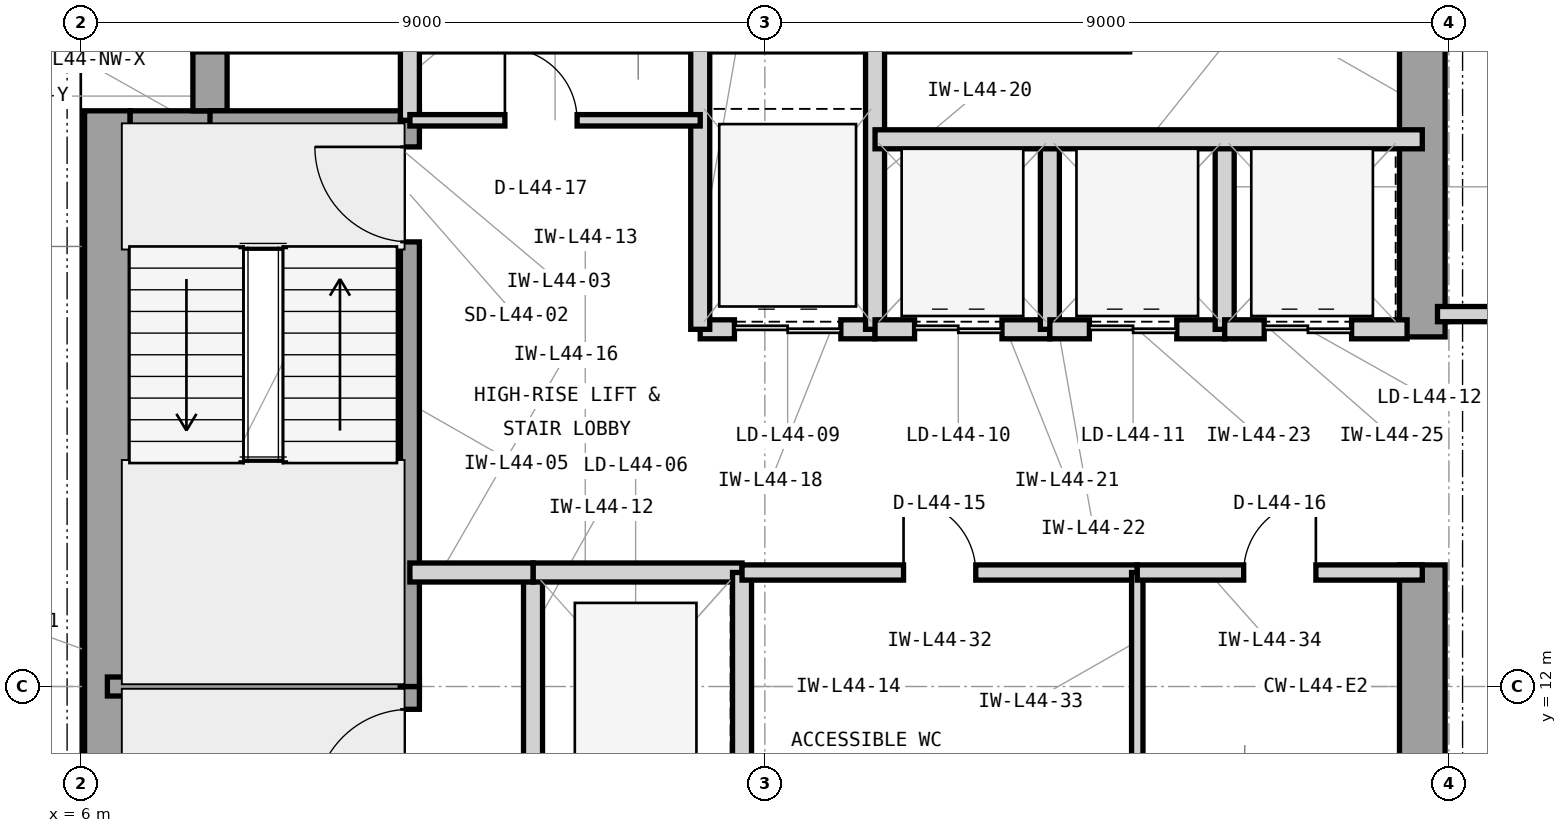
"""IFC4 building model, lengths in metres.
Left out: names, types, materials, properties, quantities, classifications, styles, units other than length and angle.
Written with IfcOpenShell. Run it as: python <this file> out.ifc"""

import sys

from ifc_helpers import new_model, si_unit, direction, frame, frame_2d, origin, place, context, subcontext, project, spatial, rectangle, extrude, element, fill, save


model = new_model("IFC4")
c1 = context("Model", 3, precision=1e-05, world=origin(), true_north=direction((0.0, 1.0)))
c2 = subcontext(c1, "Body", "Model", "MODEL_VIEW")
j1 = project(units=[si_unit("LENGTHUNIT", "METRE"), si_unit("PLANEANGLEUNIT", "RADIAN")], contexts=[c1])
p1 = place(None, origin())
s1 = spatial("IfcSite", under=j1, at=p1, CompositionType="ELEMENT")
p2 = place(p1, origin())
s2 = spatial("IfcBuilding", under=s1, at=p2, CompositionType="ELEMENT")
p3 = place(p2, frame((0.0, 0.0, 183.9)))
s3 = spatial("IfcBuildingStorey", under=s2, at=p3, CompositionType="ELEMENT", Elevation=183.9)
p4 = place(p3, frame((6.35, 4.425, 0.0), z_axis=(0.0, 0.0, 1.0), x_axis=(0.0, 1.0, 0.0)))
e1 = element("IfcWall", 1, at=p4, inside=s3, PredefinedType="SHEAR", context=c2, shape_type="SweptSolid", body=[
    extrude(rectangle(XDim=15.15, YDim=0.6, at=frame_2d((7.575, 0.0))), origin(), (0.0, 0.0, 1.0), 3.9),
])
p5 = place(p3, frame((7.475, 20.65, 0.0), z_axis=(0.0, 0.0, 1.0), x_axis=(1.0, 0.0, 0.0)))
e2 = element("IfcWall", 2, at=p5, inside=s3, PredefinedType="SHEAR", context=c2, shape_type="SweptSolid", body=[
    extrude(rectangle(XDim=12.325, YDim=0.6, at=frame_2d((6.163, 0.0))), origin(), (0.0, 0.0, 1.0), 3.9),
])
p6 = place(p3, frame((23.65, 10.4, 0.0), z_axis=(0.0, 0.0, 1.0), x_axis=(0.0, 1.0, 0.0)))
e3 = element("IfcWall", 3, at=p6, inside=s3, PredefinedType="SHEAR", context=c2, shape_type="SweptSolid", body=[
    extrude(rectangle(XDim=3.2, YDim=0.6, at=frame_2d((1.6, 0.0))), origin(), (0.0, 0.0, 1.0), 3.9),
])
p7 = place(p3, frame((23.65, 16.6, 0.0), z_axis=(0.0, 0.0, 1.0), x_axis=(0.0, 1.0, 0.0)))
e4 = element("IfcWall", 4, at=p7, inside=s3, PredefinedType="SHEAR", context=c2, shape_type="SweptSolid", body=[
    extrude(rectangle(XDim=4.05, YDim=0.6, at=frame_2d((2.025, 0.0))), origin(), (0.0, 0.0, 1.0), 3.9),
])
p8 = place(p3, frame((6.65, 19.35, 0.0), z_axis=(0.0, 0.0, 1.0), x_axis=(1.0, 0.0, 0.0)))
e5 = element("IfcWall", 5, at=p8, inside=s3, PredefinedType="SHEAR", context=c2, shape_type="SweptSolid", body=[
    extrude(rectangle(XDim=1.275, YDim=0.45, at=frame_2d((0.638, 0.0))), origin(), (0.0, 0.0, 1.0), 3.9),
])
p9 = place(p3, frame((7.7, 19.575, 0.0), z_axis=(0.0, 0.0, 1.0), x_axis=(0.0, 1.0, 0.0)))
e6 = element("IfcWall", 6, at=p9, inside=s3, PredefinedType="SHEAR", context=c2, shape_type="SweptSolid", body=[
    extrude(rectangle(XDim=0.775, YDim=0.45, at=frame_2d((0.388, 0.0))), origin(), (0.0, 0.0, 1.0), 3.9),
])
p10 = place(p3, frame((6.35, 12.0, 0.0), z_axis=(0.0, 0.0, 1.0), x_axis=(1.0, 0.0, 0.0)))
e7 = element("IfcWall", 7, at=p10, inside=s3, PredefinedType="SHEAR", context=c2, shape_type="SweptSolid", body=[
    extrude(rectangle(XDim=4.105, YDim=0.25, at=frame_2d((2.052, 0.0))), origin(), (0.0, 0.0, 1.0), 3.9),
])
p11 = place(p3, frame((7.7, 19.45, 0.0), z_axis=(0.0, 0.0, 1.0), x_axis=(1.0, 0.0, 0.0)))
e8 = element("IfcWall", 8, at=p11, inside=s3, PredefinedType="SHEAR", context=c2, shape_type="SweptSolid", body=[
    extrude(rectangle(XDim=2.755, YDim=0.25, at=frame_2d((1.377, 0.0))), origin(), (0.0, 0.0, 1.0), 3.9),
])
p12 = place(p3, frame((10.33, 4.55, 0.0), z_axis=(0.0, 0.0, 1.0), x_axis=(0.0, 1.0, 0.0)))
e9 = element("IfcWall", 9, at=p12, inside=s3, PredefinedType="SHEAR", context=c2, shape_type="SweptSolid", body=[
    extrude(rectangle(XDim=7.45, YDim=0.25, at=frame_2d((3.725, 0.0))), origin(), (0.0, 0.0, 1.0), 3.9),
])
p13 = place(p12, frame((5.9, 0.0, 0.0)))
e10 = element("IfcOpeningElement", 10, at=p13, cuts=e9, PredefinedType="OPENING", context=c2, shape_type="SweptSolid", body=[
    extrude(rectangle(XDim=1.25, YDim=2.2, at=frame_2d((0.625, 1.1))), frame((0.0, 0.135, 0.0), z_axis=(0.0, -1.0, 0.0), x_axis=(1.0, 0.0, 0.0)), (0.0, 0.0, 1.0), 0.27),
])
p14 = place(p3, frame((10.33, 12.0, 0.0), z_axis=(0.0, 0.0, 1.0), x_axis=(0.0, 1.0, 0.0)))
e11 = element("IfcWall", 11, at=p14, inside=s3, PredefinedType="SHEAR", context=c2, shape_type="SweptSolid", body=[
    extrude(rectangle(XDim=7.45, YDim=0.25, at=frame_2d((3.725, 0.0))), origin(), (0.0, 0.0, 1.0), 3.9),
])
p15 = place(p14, frame((5.85, 0.0, 0.0)))
e12 = element("IfcOpeningElement", 12, at=p15, cuts=e11, PredefinedType="OPENING", context=c2, shape_type="SweptSolid", body=[
    extrude(rectangle(XDim=1.25, YDim=2.2, at=frame_2d((0.625, 1.1))), frame((0.0, 0.135, 0.0), z_axis=(0.0, -1.0, 0.0), x_axis=(1.0, 0.0, 0.0)), (0.0, 0.0, 1.0), 0.27),
])
p16 = place(p3, frame((10.33, 19.45, 0.0), z_axis=(0.0, 0.0, 1.0), x_axis=(0.0, 1.0, 0.0)))
e13 = element("IfcWall", 13, at=p16, inside=s3, PredefinedType="PARTITIONING", context=c2, shape_type="SweptSolid", body=[
    extrude(rectangle(XDim=1.2, YDim=0.25, at=frame_2d((0.6, 0.0))), origin(), (0.0, 0.0, 1.0), 3.073),
])
p17 = place(p3, frame((11.95, 10.5, 0.0), z_axis=(0.0, 0.0, 1.0), x_axis=(0.0, 1.0, 0.0)))
e14 = element("IfcWall", 14, at=p17, inside=s3, PredefinedType="PARTITIONING", context=c2, shape_type="SweptSolid", body=[
    extrude(rectangle(XDim=3.0, YDim=0.25, at=frame_2d((1.5, 0.0))), origin(), (0.0, 0.0, 1.0), 3.69),
])
p18 = place(p3, frame((11.95, 13.5, 0.0), z_axis=(0.0, 0.0, 1.0), x_axis=(1.0, 0.0, 0.0)))
e15 = element("IfcWall", 15, at=p18, inside=s3, PredefinedType="PARTITIONING", context=c2, shape_type="SweptSolid", body=[
    extrude(rectangle(XDim=2.75, YDim=0.25, at=frame_2d((1.375, 0.0))), origin(), (0.0, 0.0, 1.0), 3.283),
])
p19 = place(p3, frame((14.7, 10.5, 0.0), z_axis=(0.0, 0.0, 1.0), x_axis=(0.0, 1.0, 0.0)))
e16 = element("IfcWall", 16, at=p19, inside=s3, PredefinedType="PARTITIONING", context=c2, shape_type="SweptSolid", body=[
    extrude(rectangle(XDim=3.0, YDim=0.25, at=frame_2d((1.5, 0.0))), origin(), (0.0, 0.0, 1.0), 3.69),
])
p20 = place(p3, frame((10.33, 13.5, 0.0), z_axis=(0.0, 0.0, 1.0), x_axis=(1.0, 0.0, 0.0)))
e17 = element("IfcWall", 17, at=p20, inside=s3, PredefinedType="PARTITIONING", context=c2, shape_type="SweptSolid", body=[
    extrude(rectangle(XDim=1.62, YDim=0.25, at=frame_2d((0.81, 0.0))), origin(), (0.0, 0.0, 1.0), 3.283),
])
p21 = place(p3, frame((14.15, 16.7, 0.0), z_axis=(0.0, 0.0, 1.0), x_axis=(1.0, 0.0, 0.0)))
e18 = element("IfcWall", 18, at=p21, inside=s3, PredefinedType="PARTITIONING", context=c2, shape_type="SweptSolid", body=[
    extrude(rectangle(XDim=2.3, YDim=0.25, at=frame_2d((1.15, 0.0))), origin(), (0.0, 0.0, 1.0), 3.283),
])
p22 = place(p21, frame((0.45, 0.0, 0.0)))
e19 = element("IfcOpeningElement", 19, at=p22, cuts=e18, PredefinedType="OPENING", context=c2, shape_type="SweptSolid", body=[
    extrude(rectangle(XDim=1.4, YDim=2.35, at=frame_2d((0.7, 1.175))), frame((0.0, 0.135, 0.0), z_axis=(0.0, -1.0, 0.0), x_axis=(1.0, 0.0, 0.0)), (0.0, 0.0, 1.0), 0.27),
])
for number, where, z_axis, x_axis in (
    (20, (14.15, 16.7, 0.0), (0.0, 0.0, 1.0), (0.0, 1.0, 0.0)),
    (21, (16.45, 16.7, 0.0), (0.0, 0.0, 1.0), (0.0, 1.0, 0.0)),
):
    element("IfcWall", number, at=place(p3, frame(where, z_axis=z_axis, x_axis=x_axis)), inside=s3, PredefinedType="PARTITIONING", context=c2, shape_type="SweptSolid", body=[
        extrude(rectangle(XDim=3.95, YDim=0.25, at=frame_2d((1.975, 0.0))), origin(), (0.0, 0.0, 1.0), 3.69),
    ])
p23 = place(p3, frame((16.45, 16.7, 0.0), z_axis=(0.0, 0.0, 1.0), x_axis=(1.0, 0.0, 0.0)))
e22 = element("IfcWall", 22, at=p23, inside=s3, PredefinedType="PARTITIONING", context=c2, shape_type="SweptSolid", body=[
    extrude(rectangle(XDim=2.3, YDim=0.25, at=frame_2d((1.15, 0.0))), origin(), (0.0, 0.0, 1.0), 3.283),
])
p24 = place(p23, frame((0.52, 0.0, 0.0)))
e23 = element("IfcOpeningElement", 23, at=p24, cuts=e22, PredefinedType="OPENING", context=c2, shape_type="SweptSolid", body=[
    extrude(rectangle(XDim=1.15, YDim=2.25, at=frame_2d((0.575, 1.125))), frame((0.0, 0.135, 0.0), z_axis=(0.0, -1.0, 0.0), x_axis=(1.0, 0.0, 0.0)), (0.0, 0.0, 1.0), 0.27),
])
p25 = place(p3, frame((18.75, 16.7, 0.0), z_axis=(0.0, 0.0, 1.0), x_axis=(0.0, 1.0, 0.0)))
e24 = element("IfcWall", 24, at=p25, inside=s3, PredefinedType="PARTITIONING", context=c2, shape_type="SweptSolid", body=[
    extrude(rectangle(XDim=2.5, YDim=0.25, at=frame_2d((1.25, 0.0))), origin(), (0.0, 0.0, 1.0), 3.69),
])
p26 = place(p3, frame((18.75, 16.7, 0.0), z_axis=(0.0, 0.0, 1.0), x_axis=(1.0, 0.0, 0.0)))
e25 = element("IfcWall", 25, at=p26, inside=s3, PredefinedType="PARTITIONING", context=c2, shape_type="SweptSolid", body=[
    extrude(rectangle(XDim=2.3, YDim=0.25, at=frame_2d((1.15, 0.0))), origin(), (0.0, 0.0, 1.0), 3.283),
])
p27 = place(p26, frame((0.52, 0.0, 0.0)))
e26 = element("IfcOpeningElement", 26, at=p27, cuts=e25, PredefinedType="OPENING", context=c2, shape_type="SweptSolid", body=[
    extrude(rectangle(XDim=1.15, YDim=2.25, at=frame_2d((0.575, 1.125))), frame((0.0, 0.135, 0.0), z_axis=(0.0, -1.0, 0.0), x_axis=(1.0, 0.0, 0.0)), (0.0, 0.0, 1.0), 0.27),
])
p28 = place(p3, frame((21.05, 16.7, 0.0), z_axis=(0.0, 0.0, 1.0), x_axis=(0.0, 1.0, 0.0)))
e27 = element("IfcWall", 27, at=p28, inside=s3, PredefinedType="PARTITIONING", context=c2, shape_type="SweptSolid", body=[
    extrude(rectangle(XDim=2.5, YDim=0.25, at=frame_2d((1.25, 0.0))), origin(), (0.0, 0.0, 1.0), 3.69),
])
p29 = place(p3, frame((21.05, 16.7, 0.0), z_axis=(0.0, 0.0, 1.0), x_axis=(1.0, 0.0, 0.0)))
e28 = element("IfcWall", 28, at=p29, inside=s3, PredefinedType="PARTITIONING", context=c2, shape_type="SweptSolid", body=[
    extrude(rectangle(XDim=2.4, YDim=0.25, at=frame_2d((1.2, 0.0))), origin(), (0.0, 0.0, 1.0), 3.283),
])
p30 = place(p29, frame((0.52, 0.0, 0.0)))
e29 = element("IfcOpeningElement", 29, at=p30, cuts=e28, PredefinedType="OPENING", context=c2, shape_type="SweptSolid", body=[
    extrude(rectangle(XDim=1.15, YDim=2.25, at=frame_2d((0.575, 1.125))), frame((0.0, 0.135, 0.0), z_axis=(0.0, -1.0, 0.0), x_axis=(1.0, 0.0, 0.0)), (0.0, 0.0, 1.0), 0.27),
])
p31 = place(p3, frame((16.45, 19.2, 0.0), z_axis=(0.0, 0.0, 1.0), x_axis=(1.0, 0.0, 0.0)))
e30 = element("IfcWall", 30, at=p31, inside=s3, PredefinedType="PARTITIONING", context=c2, shape_type="SweptSolid", body=[
    extrude(rectangle(XDim=7.2, YDim=0.25, at=frame_2d((3.6, 0.0))), origin(), (0.0, 0.0, 1.0), 3.69),
])
p32 = place(p3, frame((14.7, 13.5, 0.0), z_axis=(0.0, 0.0, 1.0), x_axis=(1.0, 0.0, 0.0)))
e31 = element("IfcWall", 31, at=p32, inside=s3, PredefinedType="PARTITIONING", context=c2, shape_type="SweptSolid", body=[
    extrude(rectangle(XDim=5.2, YDim=0.2, at=frame_2d((2.6, 0.0))), origin(), (0.0, 0.0, 1.0), 3.283),
])
p33 = place(p32, frame((2.125, 0.0, 0.0)))
e32 = element("IfcOpeningElement", 32, at=p33, cuts=e31, PredefinedType="OPENING", context=c2, shape_type="SweptSolid", body=[
    extrude(rectangle(XDim=0.95, YDim=2.1, at=frame_2d((0.475, 1.05))), frame((0.0, 0.11, 0.0), z_axis=(0.0, -1.0, 0.0), x_axis=(1.0, 0.0, 0.0)), (0.0, 0.0, 1.0), 0.22),
])
p34 = place(p3, frame((19.9, 9.88, 0.0), z_axis=(0.0, 0.0, 1.0), x_axis=(0.0, 1.0, 0.0)))
e33 = element("IfcWall", 33, at=p34, inside=s3, PredefinedType="PARTITIONING", context=c2, shape_type="SweptSolid", body=[
    extrude(rectangle(XDim=3.62, YDim=0.15, at=frame_2d((1.81, 0.0))), origin(), (0.0, 0.0, 1.0), 3.69),
])
p35 = place(p3, frame((19.9, 13.5, 0.0), z_axis=(0.0, 0.0, 1.0), x_axis=(1.0, 0.0, 0.0)))
e34 = element("IfcWall", 34, at=p35, inside=s3, PredefinedType="PARTITIONING", context=c2, shape_type="SweptSolid", body=[
    extrude(rectangle(XDim=3.75, YDim=0.2, at=frame_2d((1.875, 0.0))), origin(), (0.0, 0.0, 1.0), 3.283),
])
p36 = place(p35, frame((1.4, 0.0, 0.0)))
e35 = element("IfcOpeningElement", 35, at=p36, cuts=e34, PredefinedType="OPENING", context=c2, shape_type="SweptSolid", body=[
    extrude(rectangle(XDim=0.95, YDim=2.1, at=frame_2d((0.475, 1.05))), frame((0.0, 0.11, 0.0), z_axis=(0.0, -1.0, 0.0), x_axis=(1.0, 0.0, 0.0)), (0.0, 0.0, 1.0), 0.22),
])
p37 = place(p3, frame((10.33, 19.45, 0.0), z_axis=(0.0, 0.0, 1.0), x_axis=(1.0, 0.0, 0.0)))
e36 = element("IfcWall", 36, at=p37, inside=s3, PredefinedType="PARTITIONING", context=c2, shape_type="SweptSolid", body=[
    extrude(rectangle(XDim=3.82, YDim=0.15, at=frame_2d((1.91, 0.0))), origin(), (0.0, 0.0, 1.0), 3.69),
])
p38 = place(p37, frame((1.25, 0.0, 0.0)))
e37 = element("IfcOpeningElement", 37, at=p38, cuts=e36, PredefinedType="OPENING", context=c2, shape_type="SweptSolid", body=[
    extrude(rectangle(XDim=0.95, YDim=2.1, at=frame_2d((0.475, 1.05))), frame((0.0, 0.085, 0.0), z_axis=(0.0, -1.0, 0.0), x_axis=(1.0, 0.0, 0.0)), (0.0, 0.0, 1.0), 0.17),
])
p39 = place(p3, frame((23.85, 16.9, 0.0), z_axis=(0.0, 0.0, 1.0), x_axis=(1.0, 0.0, 0.0)))
e38 = element("IfcWall", 38, at=p39, inside=s3, PredefinedType="PARTITIONING", context=c2, shape_type="SweptSolid", body=[
    extrude(rectangle(XDim=2.85, YDim=0.2, at=frame_2d((1.425, 0.0))), origin(), (0.0, 0.0, 1.0), 3.69),
])
p40 = place(p39, frame((0.7, 0.0, 0.0)))
e39 = element("IfcOpeningElement", 39, at=p40, cuts=e38, PredefinedType="OPENING", context=c2, shape_type="SweptSolid", body=[
    extrude(rectangle(XDim=1.0, YDim=2.15, at=frame_2d((0.5, 1.075))), frame((0.0, 0.11, 0.0), z_axis=(0.0, -1.0, 0.0), x_axis=(1.0, 0.0, 0.0)), (0.0, 0.0, 1.0), 0.22),
])
p41 = place(p13, origin())
e40 = element("IfcDoor", 40, at=p41, inside=s3, OperationType="SINGLE_SWING_LEFT", PredefinedType="DOOR", context=c2, shape_type="SweptSolid", body=[
    extrude(rectangle(XDim=1.25, YDim=2.2, at=frame_2d((0.625, 1.1))), frame((0.0, 0.025, 0.0), z_axis=(0.0, -1.0, 0.0), x_axis=(1.0, 0.0, 0.0)), (0.0, 0.0, 1.0), 0.05),
])
fill(e10, e40)
p42 = place(p15, origin())
e41 = element("IfcDoor", 41, at=p42, inside=s3, OperationType="SINGLE_SWING_RIGHT", PredefinedType="DOOR", context=c2, shape_type="SweptSolid", body=[
    extrude(rectangle(XDim=1.25, YDim=2.2, at=frame_2d((0.625, 1.1))), frame((0.0, 0.025, 0.0), z_axis=(0.0, -1.0, 0.0), x_axis=(1.0, 0.0, 0.0)), (0.0, 0.0, 1.0), 0.05),
])
fill(e12, e41)
p43 = place(p22, origin())
e42 = element("IfcDoor", 42, at=p43, inside=s3, OperationType="DOUBLE_DOOR_SLIDING", PredefinedType="DOOR", context=c2, shape_type="SweptSolid", body=[
    extrude(rectangle(XDim=1.4, YDim=2.35, at=frame_2d((0.7, 1.175))), frame((0.0, 0.025, 0.0), z_axis=(0.0, -1.0, 0.0), x_axis=(1.0, 0.0, 0.0)), (0.0, 0.0, 1.0), 0.05),
])
fill(e19, e42)
p44 = place(p24, origin())
e43 = element("IfcDoor", 43, at=p44, inside=s3, OperationType="DOUBLE_DOOR_SLIDING", PredefinedType="DOOR", context=c2, shape_type="SweptSolid", body=[
    extrude(rectangle(XDim=1.15, YDim=2.25, at=frame_2d((0.575, 1.125))), frame((0.0, 0.025, 0.0), z_axis=(0.0, -1.0, 0.0), x_axis=(1.0, 0.0, 0.0)), (0.0, 0.0, 1.0), 0.05),
])
fill(e23, e43)
p45 = place(p27, origin())
e44 = element("IfcDoor", 44, at=p45, inside=s3, OperationType="DOUBLE_DOOR_SLIDING", PredefinedType="DOOR", context=c2, shape_type="SweptSolid", body=[
    extrude(rectangle(XDim=1.15, YDim=2.25, at=frame_2d((0.575, 1.125))), frame((0.0, 0.025, 0.0), z_axis=(0.0, -1.0, 0.0), x_axis=(1.0, 0.0, 0.0)), (0.0, 0.0, 1.0), 0.05),
])
fill(e26, e44)
p46 = place(p30, origin())
e45 = element("IfcDoor", 45, at=p46, inside=s3, OperationType="DOUBLE_DOOR_SLIDING", PredefinedType="DOOR", context=c2, shape_type="SweptSolid", body=[
    extrude(rectangle(XDim=1.15, YDim=2.25, at=frame_2d((0.575, 1.125))), frame((0.0, 0.025, 0.0), z_axis=(0.0, -1.0, 0.0), x_axis=(1.0, 0.0, 0.0)), (0.0, 0.0, 1.0), 0.05),
])
fill(e29, e45)
p47 = place(p33, origin())
e46 = element("IfcDoor", 46, at=p47, inside=s3, OperationType="SINGLE_SWING_LEFT", PredefinedType="DOOR", context=c2, shape_type="SweptSolid", body=[
    extrude(rectangle(XDim=0.95, YDim=2.1, at=frame_2d((0.475, 1.05))), frame((0.0, 0.025, 0.0), z_axis=(0.0, -1.0, 0.0), x_axis=(1.0, 0.0, 0.0)), (0.0, 0.0, 1.0), 0.05),
])
fill(e32, e46)
p48 = place(p36, origin())
e47 = element("IfcDoor", 47, at=p48, inside=s3, OperationType="SINGLE_SWING_RIGHT", PredefinedType="DOOR", context=c2, shape_type="SweptSolid", body=[
    extrude(rectangle(XDim=0.95, YDim=2.1, at=frame_2d((0.475, 1.05))), frame((0.0, 0.025, 0.0), z_axis=(0.0, -1.0, 0.0), x_axis=(1.0, 0.0, 0.0)), (0.0, 0.0, 1.0), 0.05),
])
fill(e35, e47)
p49 = place(p38, origin())
e48 = element("IfcDoor", 48, at=p49, inside=s3, OperationType="SINGLE_SWING_LEFT", PredefinedType="DOOR", context=c2, shape_type="SweptSolid", body=[
    extrude(rectangle(XDim=0.95, YDim=2.1, at=frame_2d((0.475, 1.05))), frame((0.0, 0.025, 0.0), z_axis=(0.0, -1.0, 0.0), x_axis=(1.0, 0.0, 0.0)), (0.0, 0.0, 1.0), 0.05),
])
fill(e37, e48)
save(model, sys.argv[1])
